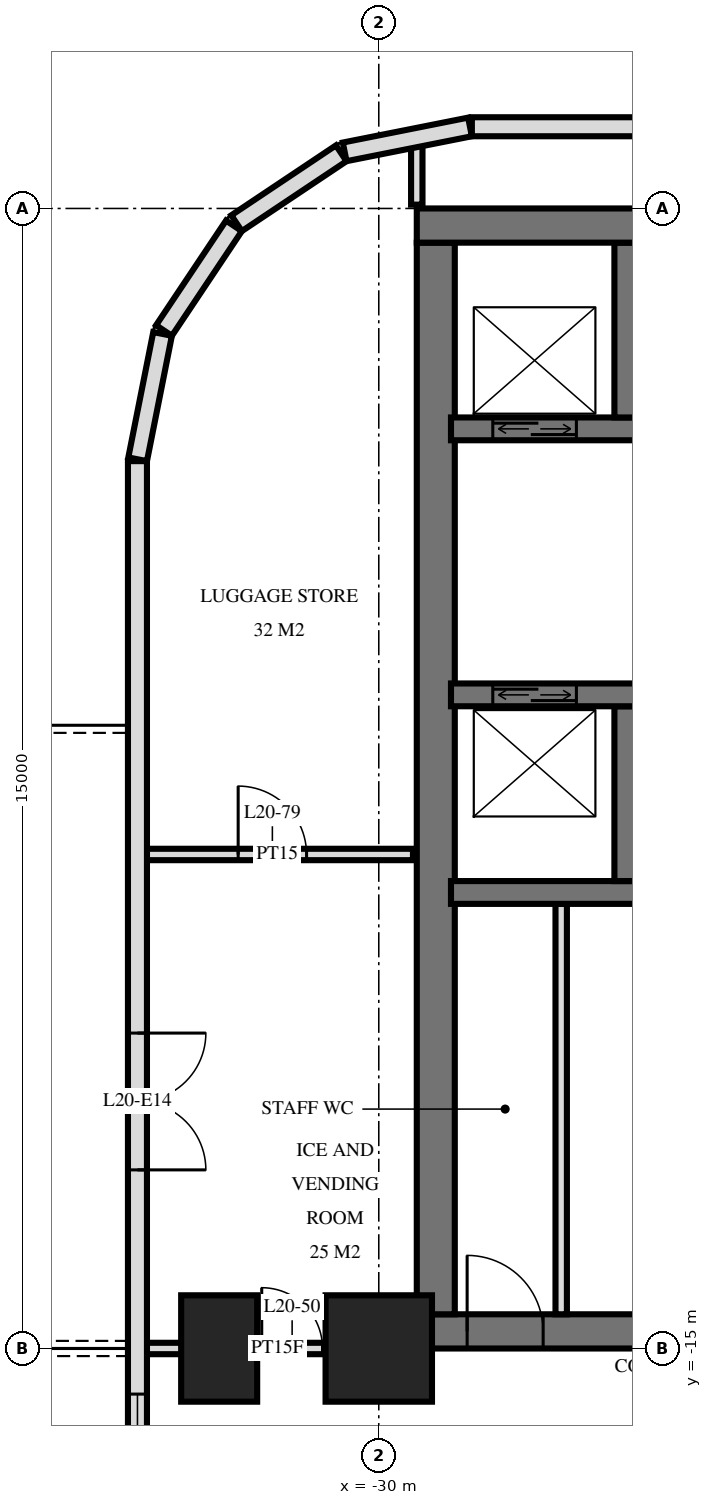
"""IFC4 building model, lengths in metres.
Left out: names, types, materials, properties, quantities, classifications, styles, units other than length and angle.
Written with IfcOpenShell. Run it as: python <this file> out.ifc"""

import sys

from ifc_helpers import new_model, si_unit, direction, frame, frame_2d, origin, origin_2d, place, context, subcontext, project, spatial, rectangle, extrude, element, fill, save


model = new_model("IFC4")
c1 = context("Model", 3, precision=1e-05, world=origin(), true_north=direction((0.0, 1.0)))
c2 = subcontext(c1, "Body", "Model", "MODEL_VIEW")
j1 = project(units=[si_unit("LENGTHUNIT", "METRE"), si_unit("PLANEANGLEUNIT", "RADIAN")], contexts=[c1])
p1 = place(None, origin())
s1 = spatial("IfcSite", under=j1, at=p1, CompositionType="ELEMENT")
p2 = place(p1, origin())
s2 = spatial("IfcBuilding", under=s1, at=p2, CompositionType="ELEMENT")
p3 = place(p2, frame((0.0, 0.0, 81.6)))
s3 = spatial("IfcBuildingStorey", under=s2, at=p3, CompositionType="ELEMENT", Elevation=81.6)
p4 = place(p3, frame((-32.1, -15.0, 0.0), z_axis=(0.0, 0.0, 1.0), x_axis=(0.0, 1.0, 0.0)))
e1 = element("IfcColumn", 1, at=p4, inside=s3, PredefinedType="COLUMN", context=c2, shape_type="SweptSolid", body=[
    extrude(rectangle(XDim=1.4, YDim=1.0, at=origin_2d()), origin(), (0.0, 0.0, 1.0), 3.6),
])
p5 = place(p3, frame((-30.0, -15.0, 0.0), z_axis=(0.0, 0.0, 1.0), x_axis=(1.0, 0.0, 0.0)))
e2 = element("IfcColumn", 2, at=p5, inside=s3, PredefinedType="COLUMN", context=c2, shape_type="SweptSolid", body=[
    extrude(rectangle(XDim=1.4, YDim=1.4, at=origin_2d()), origin(), (0.0, 0.0, 1.0), 3.6),
])
p6 = place(p3, frame((-29.5, -0.225, 0.0), z_axis=(0.0, 0.0, 1.0), x_axis=(1.0, 0.0, 0.0)))
e3 = element("IfcWall", 3, at=p6, inside=s3, PredefinedType="SHEAR", context=c2, shape_type="SweptSolid", body=[
    extrude(rectangle(XDim=19.5, YDim=0.45, at=frame_2d((9.75, 0.0))), origin(), (0.0, 0.0, 1.0), 3.6),
])
p7 = place(p3, frame((-29.5, -14.775, 0.0), z_axis=(0.0, 0.0, 1.0), x_axis=(1.0, 0.0, 0.0)))
e4 = element("IfcWall", 4, at=p7, inside=s3, PredefinedType="SHEAR", context=c2, shape_type="SweptSolid", body=[
    extrude(rectangle(XDim=19.5, YDim=0.45, at=frame_2d((9.75, 0.0))), origin(), (0.0, 0.0, 1.0), 3.6),
])
p8 = place(p7, frame((11.2, 0.0, 0.0)))
e5 = element("IfcOpeningElement", 5, at=p8, cuts=e4, PredefinedType="OPENING", context=c2, shape_type="SweptSolid", body=[
    extrude(rectangle(XDim=1.2, YDim=2.1, at=frame_2d((0.6, 1.05))), frame((0.0, 0.235, 0.0), z_axis=(0.0, -1.0, 0.0), x_axis=(1.0, 0.0, 0.0)), (0.0, 0.0, 1.0), 0.47),
])
p9 = place(p7, frame((14.25, 0.0, 0.0)))
e6 = element("IfcOpeningElement", 6, at=p9, cuts=e4, PredefinedType="OPENING", context=c2, shape_type="SweptSolid", body=[
    extrude(rectangle(XDim=1.1, YDim=2.1, at=frame_2d((0.55, 1.05))), frame((0.0, 0.235, 0.0), z_axis=(0.0, -1.0, 0.0), x_axis=(1.0, 0.0, 0.0)), (0.0, 0.0, 1.0), 0.47),
])
p10 = place(p7, frame((8.5, 0.0, 0.0)))
e7 = element("IfcOpeningElement", 7, at=p10, cuts=e4, PredefinedType="OPENING", context=c2, shape_type="SweptSolid", body=[
    extrude(rectangle(XDim=0.9, YDim=2.1, at=frame_2d((0.45, 1.05))), frame((0.0, 0.235, 0.0), z_axis=(0.0, -1.0, 0.0), x_axis=(1.0, 0.0, 0.0)), (0.0, 0.0, 1.0), 0.47),
])
p11 = place(p7, frame((6.05, 0.0, 0.0)))
e8 = element("IfcOpeningElement", 8, at=p11, cuts=e4, PredefinedType="OPENING", context=c2, shape_type="SweptSolid", body=[
    extrude(rectangle(XDim=1.0, YDim=2.1, at=frame_2d((0.5, 1.05))), frame((0.0, 0.235, 0.0), z_axis=(0.0, -1.0, 0.0), x_axis=(1.0, 0.0, 0.0)), (0.0, 0.0, 1.0), 0.47),
])
p12 = place(p7, frame((2.988, 0.0, 0.0)))
e9 = element("IfcOpeningElement", 9, at=p12, cuts=e4, PredefinedType="OPENING", context=c2, shape_type="SweptSolid", body=[
    extrude(rectangle(XDim=1.0, YDim=2.1, at=frame_2d((0.5, 1.05))), frame((0.0, 0.235, 0.0), z_axis=(0.0, -1.0, 0.0), x_axis=(1.0, 0.0, 0.0)), (0.0, 0.0, 1.0), 0.47),
])
p13 = place(p7, frame((0.663, 0.0, 0.0)))
e10 = element("IfcOpeningElement", 10, at=p13, cuts=e4, PredefinedType="OPENING", context=c2, shape_type="SweptSolid", body=[
    extrude(rectangle(XDim=1.0, YDim=2.1, at=frame_2d((0.5, 1.05))), frame((0.0, 0.235, 0.0), z_axis=(0.0, -1.0, 0.0), x_axis=(1.0, 0.0, 0.0)), (0.0, 0.0, 1.0), 0.47),
])
p14 = place(p3, frame((-29.25, -14.55, 0.0), z_axis=(0.0, 0.0, 1.0), x_axis=(0.0, 1.0, 0.0)))
e11 = element("IfcWall", 11, at=p14, inside=s3, PredefinedType="SHEAR", context=c2, shape_type="SweptSolid", body=[
    extrude(rectangle(XDim=14.1, YDim=0.5, at=frame_2d((7.05, 0.0))), origin(), (0.0, 0.0, 1.0), 3.6),
])
p15 = place(p3, frame((-29.05, -2.9, 0.0), z_axis=(0.0, 0.0, 1.0), x_axis=(1.0, 0.0, 0.0)))
e12 = element("IfcWall", 12, at=p15, inside=s3, PredefinedType="SHEAR", context=c2, shape_type="SweptSolid", body=[
    extrude(rectangle(XDim=18.7, YDim=0.3, at=frame_2d((9.35, 0.0))), origin(), (0.0, 0.0, 1.0), 3.6),
])
p16 = place(p15, frame((2.95, 0.0, 0.0)))
e13 = element("IfcOpeningElement", 13, at=p16, cuts=e12, PredefinedType="OPENING", context=c2, shape_type="SweptSolid", body=[
    extrude(rectangle(XDim=1.1, YDim=2.1, at=frame_2d((0.55, 1.05))), frame((0.0, 0.16, 0.0), z_axis=(0.0, -1.0, 0.0), x_axis=(1.0, 0.0, 0.0)), (0.0, 0.0, 1.0), 0.32),
])
p17 = place(p15, frame((0.55, 0.0, 0.0)))
e14 = element("IfcOpeningElement", 14, at=p17, cuts=e12, PredefinedType="OPENING", context=c2, shape_type="SweptSolid", body=[
    extrude(rectangle(XDim=1.1, YDim=2.1, at=frame_2d((0.55, 1.05))), frame((0.0, 0.16, 0.0), z_axis=(0.0, -1.0, 0.0), x_axis=(1.0, 0.0, 0.0)), (0.0, 0.0, 1.0), 0.32),
])
p18 = place(p15, frame((11.863, 0.0, 0.0)))
e15 = element("IfcOpeningElement", 15, at=p18, cuts=e12, PredefinedType="OPENING", context=c2, shape_type="SweptSolid", body=[
    extrude(rectangle(XDim=0.9, YDim=2.1, at=frame_2d((0.45, 1.05))), frame((0.0, 0.16, 0.0), z_axis=(0.0, -1.0, 0.0), x_axis=(1.0, 0.0, 0.0)), (0.0, 0.0, 1.0), 0.32),
])
p19 = place(p15, frame((10.438, 0.0, 0.0)))
e16 = element("IfcOpeningElement", 16, at=p19, cuts=e12, PredefinedType="OPENING", context=c2, shape_type="SweptSolid", body=[
    extrude(rectangle(XDim=0.9, YDim=2.1, at=frame_2d((0.45, 1.05))), frame((0.0, 0.16, 0.0), z_axis=(0.0, -1.0, 0.0), x_axis=(1.0, 0.0, 0.0)), (0.0, 0.0, 1.0), 0.32),
])
p20 = place(p15, frame((16.85, 0.0, 0.0)))
e17 = element("IfcOpeningElement", 17, at=p20, cuts=e12, PredefinedType="OPENING", context=c2, shape_type="SweptSolid", body=[
    extrude(rectangle(XDim=1.0, YDim=2.1, at=frame_2d((0.5, 1.05))), frame((0.0, 0.16, 0.0), z_axis=(0.0, -1.0, 0.0), x_axis=(1.0, 0.0, 0.0)), (0.0, 0.0, 1.0), 0.32),
])
p21 = place(p15, frame((14.562, 0.0, 0.0)))
e18 = element("IfcOpeningElement", 18, at=p21, cuts=e12, PredefinedType="OPENING", context=c2, shape_type="SweptSolid", body=[
    extrude(rectangle(XDim=1.0, YDim=2.1, at=frame_2d((0.5, 1.05))), frame((0.0, 0.16, 0.0), z_axis=(0.0, -1.0, 0.0), x_axis=(1.0, 0.0, 0.0)), (0.0, 0.0, 1.0), 0.32),
])
p22 = place(p15, frame((13.137, 0.0, 0.0)))
e19 = element("IfcOpeningElement", 19, at=p22, cuts=e12, PredefinedType="OPENING", context=c2, shape_type="SweptSolid", body=[
    extrude(rectangle(XDim=1.0, YDim=2.1, at=frame_2d((0.5, 1.05))), frame((0.0, 0.16, 0.0), z_axis=(0.0, -1.0, 0.0), x_axis=(1.0, 0.0, 0.0)), (0.0, 0.0, 1.0), 0.32),
])
p23 = place(p15, frame((5.6, 0.0, 0.0)))
e20 = element("IfcOpeningElement", 20, at=p23, cuts=e12, PredefinedType="OPENING", context=c2, shape_type="SweptSolid", body=[
    extrude(rectangle(XDim=1.0, YDim=2.1, at=frame_2d((0.5, 1.05))), frame((0.0, 0.16, 0.0), z_axis=(0.0, -1.0, 0.0), x_axis=(1.0, 0.0, 0.0)), (0.0, 0.0, 1.0), 0.32),
])
p24 = place(p3, frame((-29.05, -6.4, 0.0), z_axis=(0.0, 0.0, 1.0), x_axis=(1.0, 0.0, 0.0)))
e21 = element("IfcWall", 21, at=p24, inside=s3, PredefinedType="SHEAR", context=c2, shape_type="SweptSolid", body=[
    extrude(rectangle(XDim=18.7, YDim=0.3, at=frame_2d((9.35, 0.0))), origin(), (0.0, 0.0, 1.0), 3.6),
])
p25 = place(p24, frame((2.95, 0.0, 0.0)))
e22 = element("IfcOpeningElement", 22, at=p25, cuts=e21, PredefinedType="OPENING", context=c2, shape_type="SweptSolid", body=[
    extrude(rectangle(XDim=1.1, YDim=2.1, at=frame_2d((0.55, 1.05))), frame((0.0, 0.16, 0.0), z_axis=(0.0, -1.0, 0.0), x_axis=(1.0, 0.0, 0.0)), (0.0, 0.0, 1.0), 0.32),
])
p26 = place(p24, frame((0.55, 0.0, 0.0)))
e23 = element("IfcOpeningElement", 23, at=p26, cuts=e21, PredefinedType="OPENING", context=c2, shape_type="SweptSolid", body=[
    extrude(rectangle(XDim=1.1, YDim=2.1, at=frame_2d((0.55, 1.05))), frame((0.0, 0.16, 0.0), z_axis=(0.0, -1.0, 0.0), x_axis=(1.0, 0.0, 0.0)), (0.0, 0.0, 1.0), 0.32),
])
p27 = place(p24, frame((10.8, 0.0, 0.0)))
e24 = element("IfcOpeningElement", 24, at=p27, cuts=e21, PredefinedType="OPENING", context=c2, shape_type="SweptSolid", body=[
    extrude(rectangle(XDim=1.1, YDim=2.1, at=frame_2d((0.55, 1.05))), frame((0.0, 0.16, 0.0), z_axis=(0.0, -1.0, 0.0), x_axis=(1.0, 0.0, 0.0)), (0.0, 0.0, 1.0), 0.32),
])
p28 = place(p24, frame((5.6, 0.0, 0.0)))
e25 = element("IfcOpeningElement", 25, at=p28, cuts=e21, PredefinedType="OPENING", context=c2, shape_type="SweptSolid", body=[
    extrude(rectangle(XDim=1.0, YDim=2.1, at=frame_2d((0.5, 1.05))), frame((0.0, 0.16, 0.0), z_axis=(0.0, -1.0, 0.0), x_axis=(1.0, 0.0, 0.0)), (0.0, 0.0, 1.0), 0.32),
])
p29 = place(p3, frame((-29.05, -9.0, 0.0), z_axis=(0.0, 0.0, 1.0), x_axis=(1.0, 0.0, 0.0)))
e26 = element("IfcWall", 26, at=p29, inside=s3, PredefinedType="SHEAR", context=c2, shape_type="SweptSolid", body=[
    extrude(rectangle(XDim=18.7, YDim=0.3, at=frame_2d((9.35, 0.0))), origin(), (0.0, 0.0, 1.0), 3.6),
])
p30 = place(p29, frame((13.8, 0.0, 0.0)))
e27 = element("IfcOpeningElement", 27, at=p30, cuts=e26, PredefinedType="OPENING", context=c2, shape_type="SweptSolid", body=[
    extrude(rectangle(XDim=1.1, YDim=2.1, at=frame_2d((0.55, 1.05))), frame((0.0, 0.16, 0.0), z_axis=(0.0, -1.0, 0.0), x_axis=(1.0, 0.0, 0.0)), (0.0, 0.0, 1.0), 0.32),
])
for number, where, z_axis, x_axis in (
    (28, (-26.75, -2.75, 0.0), (0.0, 0.0, 1.0), (0.0, 1.0, 0.0)),
    (29, (-26.75, -8.85, 0.0), (0.0, 0.0, 1.0), (0.0, 1.0, 0.0)),
):
    element("IfcWall", number, at=place(p3, frame(where, z_axis=z_axis, x_axis=x_axis)), inside=s3, PredefinedType="SHEAR", context=c2, shape_type="SweptSolid", body=[
        extrude(rectangle(XDim=2.3, YDim=0.3, at=frame_2d((1.15, 0.0))), origin(), (0.0, 0.0, 1.0), 3.6),
    ])
p31 = place(p3, frame((28.775, 1.075, 0.0), z_axis=(0.0, 0.0, 1.0), x_axis=(-1.0, 0.0, 0.0)))
e30 = element("IfcWall", 30, at=p31, inside=s3, PredefinedType="SOLIDWALL", context=c2, shape_type="SweptSolid", body=[
    extrude(rectangle(XDim=57.551, YDim=0.25, at=frame_2d((28.775, 0.0))), origin(), (0.0, 0.0, 1.0), 3.32),
])
p32 = place(p31, frame((25.325, 0.0, 0.3)))
e31 = element("IfcOpeningElement", 31, at=p32, cuts=e30, PredefinedType="OPENING", context=c2, shape_type="SweptSolid", body=[
    extrude(rectangle(XDim=2.4, YDim=2.1, at=frame_2d((1.2, 1.05))), frame((0.0, 0.135, 0.0), z_axis=(0.0, -1.0, 0.0), x_axis=(1.0, 0.0, 0.0)), (0.0, 0.0, 1.0), 0.27),
])
p33 = place(p31, frame((30.275, 0.0, 0.3)))
e32 = element("IfcOpeningElement", 32, at=p33, cuts=e30, PredefinedType="OPENING", context=c2, shape_type="SweptSolid", body=[
    extrude(rectangle(XDim=2.4, YDim=2.1, at=frame_2d((1.2, 1.05))), frame((0.0, 0.135, 0.0), z_axis=(0.0, -1.0, 0.0), x_axis=(1.0, 0.0, 0.0)), (0.0, 0.0, 1.0), 0.27),
])
p34 = place(p31, frame((34.825, 0.0, 0.3)))
e33 = element("IfcOpeningElement", 33, at=p34, cuts=e30, PredefinedType="OPENING", context=c2, shape_type="SweptSolid", body=[
    extrude(rectangle(XDim=2.4, YDim=2.1, at=frame_2d((1.2, 1.05))), frame((0.0, 0.135, 0.0), z_axis=(0.0, -1.0, 0.0), x_axis=(1.0, 0.0, 0.0)), (0.0, 0.0, 1.0), 0.27),
])
p35 = place(p3, frame((-28.8, 1.073, 0.0), z_axis=(0.0, 0.0, 1.0), x_axis=(-0.980803419081, -0.194999110559, 0.0)))
e34 = element("IfcWall", 34, at=p35, inside=s3, PredefinedType="SOLIDWALL", context=c2, shape_type="SweptSolid", body=[
    extrude(rectangle(XDim=1.681, YDim=0.25, at=frame_2d((0.841, 0.0))), origin(), (0.0, 0.0, 1.0), 3.32),
])
for number, where, z_axis, x_axis in (
    (35, (-30.494, 0.726, 0.0), (0.0, 0.0, 1.0), (-0.831, -0.556, 0.0)),
    (36, (-31.906, -0.229, 0.0), (0.0, 0.0, 1.0), (-0.556, -0.831, 0.0)),
):
    element("IfcWall", number, at=place(p3, frame(where, z_axis=z_axis, x_axis=x_axis)), inside=s3, PredefinedType="SOLIDWALL", context=c2, shape_type="SweptSolid", body=[
        extrude(rectangle(XDim=1.656, YDim=0.25, at=frame_2d((0.828, 0.0))), origin(), (0.0, 0.0, 1.0), 3.32),
    ])
p36 = place(p3, frame((-32.844, -1.651, 0.0), z_axis=(0.0, 0.0, 1.0), x_axis=(-0.19513878023, -0.980775640221, 0.0)))
e37 = element("IfcWall", 37, at=p36, inside=s3, PredefinedType="SOLIDWALL", context=c2, shape_type="SweptSolid", body=[
    extrude(rectangle(XDim=1.681, YDim=0.25, at=frame_2d((0.841, 0.0))), origin(), (0.0, 0.0, 1.0), 3.32),
])
p37 = place(p3, frame((-33.175, -3.325, 0.0), z_axis=(0.0, 0.0, 1.0), x_axis=(0.0, -1.0, 0.0)))
e38 = element("IfcWall", 38, at=p37, inside=s3, PredefinedType="SOLIDWALL", context=c2, shape_type="SweptSolid", body=[
    extrude(rectangle(XDim=21.551, YDim=0.25, at=frame_2d((10.775, 0.0))), origin(), (0.0, 0.0, 1.0), 3.32),
])
p38 = place(p37, frame((7.525, 0.0, 0.0)))
e39 = element("IfcOpeningElement", 39, at=p38, cuts=e38, PredefinedType="OPENING", context=c2, shape_type="SweptSolid", body=[
    extrude(rectangle(XDim=1.8, YDim=2.4, at=frame_2d((0.9, 1.2))), frame((0.0, 0.135, 0.0), z_axis=(0.0, -1.0, 0.0), x_axis=(1.0, 0.0, 0.0)), (0.0, 0.0, 1.0), 0.27),
])
p39 = place(p37, frame((12.275, 0.0, 0.3)))
e40 = element("IfcOpeningElement", 40, at=p39, cuts=e38, PredefinedType="OPENING", context=c2, shape_type="SweptSolid", body=[
    extrude(rectangle(XDim=1.2, YDim=2.1, at=frame_2d((0.6, 1.05))), frame((0.0, 0.135, 0.0), z_axis=(0.0, -1.0, 0.0), x_axis=(1.0, 0.0, 0.0)), (0.0, 0.0, 1.0), 0.27),
])
p40 = place(p37, frame((15.275, 0.0, 0.0)))
e41 = element("IfcOpeningElement", 41, at=p40, cuts=e38, PredefinedType="OPENING", context=c2, shape_type="SweptSolid", body=[
    extrude(rectangle(XDim=1.8, YDim=2.4, at=frame_2d((0.9, 1.2))), frame((0.0, 0.135, 0.0), z_axis=(0.0, -1.0, 0.0), x_axis=(1.0, 0.0, 0.0)), (0.0, 0.0, 1.0), 0.27),
])
p41 = place(p37, frame((18.875, 0.0, 0.0)))
e42 = element("IfcOpeningElement", 42, at=p41, cuts=e38, PredefinedType="OPENING", context=c2, shape_type="SweptSolid", body=[
    extrude(rectangle(XDim=1.8, YDim=2.4, at=frame_2d((0.9, 1.2))), frame((0.0, 0.135, 0.0), z_axis=(0.0, -1.0, 0.0), x_axis=(1.0, 0.0, 0.0)), (0.0, 0.0, 1.0), 0.27),
])
p42 = place(p3, frame((-27.6, -14.55, 0.0), z_axis=(0.0, 0.0, 1.0), x_axis=(0.0, 1.0, 0.0)))
e43 = element("IfcWall", 43, at=p42, inside=s3, PredefinedType="PARTITIONING", context=c2, shape_type="SweptSolid", body=[
    extrude(rectangle(XDim=5.4, YDim=0.15, at=frame_2d((2.7, 0.0))), origin(), (0.0, 0.0, 1.0), 3.3),
])
p43 = place(p3, frame((-29.5, 0.05, 0.0), z_axis=(0.0, 0.0, 1.0), x_axis=(0.0, 1.0, 0.0)))
e44 = element("IfcWall", 44, at=p43, inside=s3, PredefinedType="PARTITIONING", context=c2, shape_type="SweptSolid", body=[
    extrude(rectangle(XDim=0.827, YDim=0.15, at=frame_2d((0.414, 0.0))), origin(), (0.0, 0.0, 1.0), 3.32),
])
p44 = place(p3, frame((-33.12, -15.0, 0.0), z_axis=(0.0, 0.0, 1.0), x_axis=(1.0, 0.0, 0.0)))
e45 = element("IfcWall", 45, at=p44, inside=s3, PredefinedType="PARTITIONING", context=c2, shape_type="SweptSolid", body=[
    extrude(rectangle(XDim=3.57, YDim=0.15, at=frame_2d((1.785, 0.0))), origin(), (0.0, 0.0, 1.0), 3.32),
])
p45 = place(p44, frame((1.58, 0.0, 0.0)))
e46 = element("IfcOpeningElement", 46, at=p45, cuts=e45, PredefinedType="OPENING", context=c2, shape_type="SweptSolid", body=[
    extrude(rectangle(XDim=0.8, YDim=2.1, at=frame_2d((0.4, 1.05))), frame((0.0, 0.085, 0.0), z_axis=(0.0, -1.0, 0.0), x_axis=(1.0, 0.0, 0.0)), (0.0, 0.0, 1.0), 0.17),
])
p46 = place(p3, frame((-33.12, -8.5, 0.0), z_axis=(0.0, 0.0, 1.0), x_axis=(1.0, 0.0, 0.0)))
e47 = element("IfcWall", 47, at=p46, inside=s3, PredefinedType="PARTITIONING", context=c2, shape_type="SweptSolid", body=[
    extrude(rectangle(XDim=3.57, YDim=0.15, at=frame_2d((1.785, 0.0))), origin(), (0.0, 0.0, 1.0), 3.32),
])
p47 = place(p46, frame((1.27, 0.0, 0.0)))
e48 = element("IfcOpeningElement", 48, at=p47, cuts=e47, PredefinedType="OPENING", context=c2, shape_type="SweptSolid", body=[
    extrude(rectangle(XDim=0.9, YDim=2.1, at=frame_2d((0.45, 1.05))), frame((0.0, 0.085, 0.0), z_axis=(0.0, -1.0, 0.0), x_axis=(1.0, 0.0, 0.0)), (0.0, 0.0, 1.0), 0.17),
])
p48 = place(p38, origin())
e49 = element("IfcDoor", 49, at=p48, inside=s3, OperationType="DOUBLE_DOOR_SINGLE_SWING", PredefinedType="DOOR", context=c2, shape_type="SweptSolid", body=[
    extrude(rectangle(XDim=1.8, YDim=2.4, at=frame_2d((0.9, 1.2))), frame((0.0, 0.025, 0.0), z_axis=(0.0, -1.0, 0.0), x_axis=(1.0, 0.0, 0.0)), (0.0, 0.0, 1.0), 0.05),
])
fill(e39, e49)
p49 = place(p39, origin())
e50 = element("IfcWindow", 50, at=p49, inside=s3, PartitioningType="SINGLE_PANEL", PredefinedType="WINDOW", context=c2, shape_type="SweptSolid", body=[
    extrude(rectangle(XDim=1.2, YDim=2.1, at=frame_2d((0.6, 1.05))), frame((0.0, 0.03, 0.0), z_axis=(0.0, -1.0, 0.0), x_axis=(1.0, 0.0, 0.0)), (0.0, 0.0, 1.0), 0.06),
])
fill(e40, e50)
p50 = place(p17, origin())
e51 = element("IfcDoor", 51, at=p50, inside=s3, OperationType="DOUBLE_DOOR_SLIDING", PredefinedType="USERDEFINED", context=c2, shape_type="SweptSolid", body=[
    extrude(rectangle(XDim=1.1, YDim=2.1, at=frame_2d((0.55, 1.05))), frame((0.0, 0.025, 0.0), z_axis=(0.0, -1.0, 0.0), x_axis=(1.0, 0.0, 0.0)), (0.0, 0.0, 1.0), 0.05),
])
fill(e14, e51)
p51 = place(p26, origin())
e52 = element("IfcDoor", 52, at=p51, inside=s3, OperationType="DOUBLE_DOOR_SLIDING", PredefinedType="USERDEFINED", context=c2, shape_type="SweptSolid", body=[
    extrude(rectangle(XDim=1.1, YDim=2.1, at=frame_2d((0.55, 1.05))), frame((0.0, 0.025, 0.0), z_axis=(0.0, -1.0, 0.0), x_axis=(1.0, 0.0, 0.0)), (0.0, 0.0, 1.0), 0.05),
])
fill(e23, e52)
p52 = place(p13, origin())
e53 = element("IfcDoor", 53, at=p52, inside=s3, OperationType="SINGLE_SWING_RIGHT", PredefinedType="DOOR", context=c2, shape_type="SweptSolid", body=[
    extrude(rectangle(XDim=1.0, YDim=2.1, at=frame_2d((0.5, 1.05))), frame((0.0, 0.025, 0.0), z_axis=(0.0, -1.0, 0.0), x_axis=(1.0, 0.0, 0.0)), (0.0, 0.0, 1.0), 0.05),
])
fill(e10, e53)
p53 = place(p45, origin())
e54 = element("IfcDoor", 54, at=p53, inside=s3, OperationType="SINGLE_SWING_RIGHT", PredefinedType="DOOR", context=c2, shape_type="SweptSolid", body=[
    extrude(rectangle(XDim=0.8, YDim=2.1, at=frame_2d((0.4, 1.05))), frame((0.0, 0.025, 0.0), z_axis=(0.0, -1.0, 0.0), x_axis=(1.0, 0.0, 0.0)), (0.0, 0.0, 1.0), 0.05),
])
fill(e46, e54)
p54 = place(p47, origin())
e55 = element("IfcDoor", 55, at=p54, inside=s3, OperationType="SINGLE_SWING_RIGHT", PredefinedType="DOOR", context=c2, shape_type="SweptSolid", body=[
    extrude(rectangle(XDim=0.9, YDim=2.1, at=frame_2d((0.45, 1.05))), frame((0.0, 0.025, 0.0), z_axis=(0.0, -1.0, 0.0), x_axis=(1.0, 0.0, 0.0)), (0.0, 0.0, 1.0), 0.05),
])
fill(e48, e55)
save(model, sys.argv[1])
